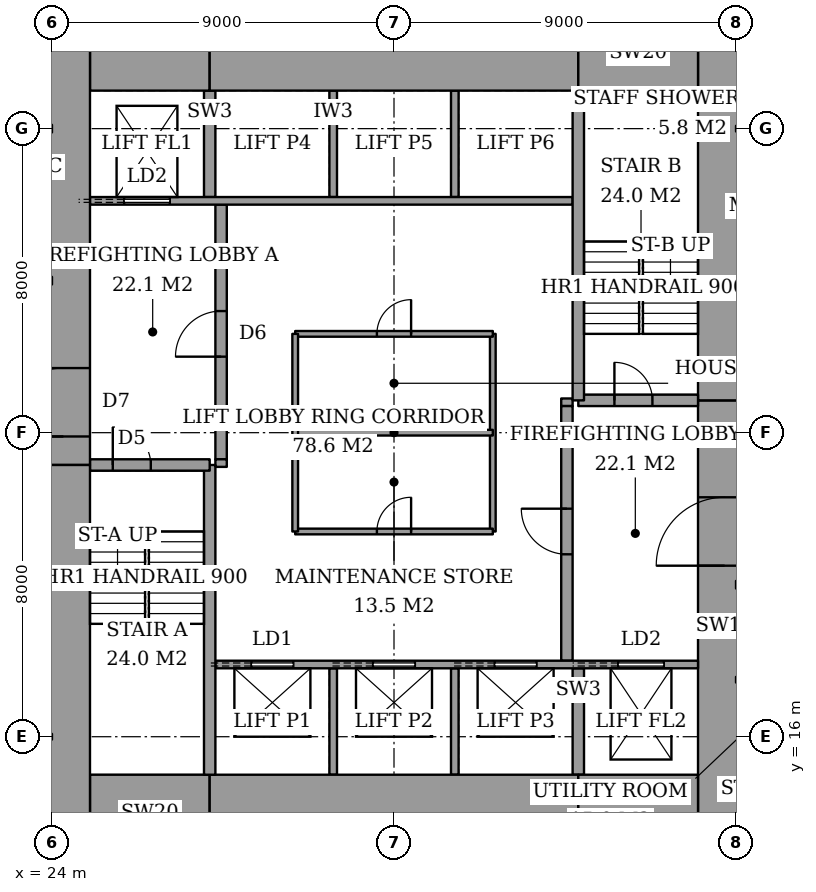
"""IFC4 building model, lengths in metres.
Left out: names, types, materials, properties, quantities, classifications, styles, units other than length and angle.
Written with IfcOpenShell. Run it as: python <this file> out.ifc"""

import sys

from ifc_helpers import new_model, si_unit, direction, frame, frame_2d, origin, place, context, subcontext, project, spatial, rectangle, extrude, element, fill, save


model = new_model("IFC4")
c1 = context("Model", 3, precision=1e-05, world=origin(), true_north=direction((0.0, 1.0)))
c2 = subcontext(c1, "Body", "Model", "MODEL_VIEW")
j1 = project(units=[si_unit("LENGTHUNIT", "METRE"), si_unit("PLANEANGLEUNIT", "RADIAN")], contexts=[c1])
p1 = place(None, origin())
s1 = spatial("IfcSite", under=j1, at=p1, CompositionType="ELEMENT")
p2 = place(p1, origin())
s2 = spatial("IfcBuilding", under=s1, at=p2, CompositionType="ELEMENT")
p3 = place(p2, frame((0.0, 0.0, 157.4)))
s3 = spatial("IfcBuildingStorey", under=s2, at=p3, CompositionType="ELEMENT", Elevation=157.4)
p4 = place(p3, frame((25.0, 14.0, 0.0), z_axis=(0.0, 0.0, 1.0), x_axis=(1.0, 0.0, 0.0)))
e1 = element("IfcWall", 1, at=p4, inside=s3, PredefinedType="SHEAR", context=c2, shape_type="SweptSolid", body=[
    extrude(rectangle(XDim=3.15, YDim=2.0, at=frame_2d((1.575, 0.0))), origin(), (0.0, 0.0, 1.0), 3.6),
])
p5 = place(p3, frame((28.15, 14.0, 0.0), z_axis=(0.0, 0.0, 1.0), x_axis=(1.0, 0.0, 0.0)))
e2 = element("IfcWall", 2, at=p5, inside=s3, PredefinedType="SHEAR", context=c2, shape_type="SweptSolid", body=[
    extrude(rectangle(XDim=9.7, YDim=2.0, at=frame_2d((4.85, 0.0))), origin(), (0.0, 0.0, 1.0), 3.6),
])
for number, where, z_axis, x_axis in (
    (3, (37.85, 14.0, 0.0), (0.0, 0.0, 1.0), (1.0, 0.0, 0.0)),
    (4, (25.0, 34.0, 0.0), (0.0, 0.0, 1.0), (1.0, 0.0, 0.0)),
):
    element("IfcWall", number, at=place(p3, frame(where, z_axis=z_axis, x_axis=x_axis)), inside=s3, PredefinedType="SHEAR", context=c2, shape_type="SweptSolid", body=[
        extrude(rectangle(XDim=3.15, YDim=2.0, at=frame_2d((1.575, 0.0))), origin(), (0.0, 0.0, 1.0), 3.6),
    ])
p6 = place(p3, frame((28.15, 34.0, 0.0), z_axis=(0.0, 0.0, 1.0), x_axis=(1.0, 0.0, 0.0)))
e5 = element("IfcWall", 5, at=p6, inside=s3, PredefinedType="SHEAR", context=c2, shape_type="SweptSolid", body=[
    extrude(rectangle(XDim=9.7, YDim=2.0, at=frame_2d((4.85, 0.0))), origin(), (0.0, 0.0, 1.0), 3.6),
])
p7 = place(p3, frame((37.85, 34.0, 0.0), z_axis=(0.0, 0.0, 1.0), x_axis=(1.0, 0.0, 0.0)))
e6 = element("IfcWall", 6, at=p7, inside=s3, PredefinedType="SHEAR", context=c2, shape_type="SweptSolid", body=[
    extrude(rectangle(XDim=3.15, YDim=2.0, at=frame_2d((1.575, 0.0))), origin(), (0.0, 0.0, 1.0), 3.6),
])
p8 = place(p3, frame((24.3, 13.0, 0.0), z_axis=(0.0, 0.0, 1.0), x_axis=(0.0, 1.0, 0.0)))
e7 = element("IfcWall", 7, at=p8, inside=s3, PredefinedType="SHEAR", context=c2, shape_type="SweptSolid", body=[
    extrude(rectangle(XDim=10.15, YDim=1.4, at=frame_2d((5.075, 0.0))), origin(), (0.0, 0.0, 1.0), 3.6),
])
p9 = place(p3, frame((24.3, 23.15, 0.0), z_axis=(0.0, 0.0, 1.0), x_axis=(0.0, 1.0, 0.0)))
e8 = element("IfcWall", 8, at=p9, inside=s3, PredefinedType="SHEAR", context=c2, shape_type="SweptSolid", body=[
    extrude(rectangle(XDim=11.85, YDim=1.4, at=frame_2d((5.925, 0.0))), origin(), (0.0, 0.0, 1.0), 3.6),
])
p10 = place(p9, frame((0.75, 0.0, 0.0)))
e9 = element("IfcOpeningElement", 9, at=p10, cuts=e8, PredefinedType="OPENING", context=c2, shape_type="SweptSolid", body=[
    extrude(rectangle(XDim=1.8, YDim=2.4, at=frame_2d((0.9, 1.2))), frame((0.0, 0.71, 0.0), z_axis=(0.0, -1.0, 0.0), x_axis=(1.0, 0.0, 0.0)), (0.0, 0.0, 1.0), 1.42),
])
p11 = place(p3, frame((41.7, 13.0, 0.0), z_axis=(0.0, 0.0, 1.0), x_axis=(0.0, 1.0, 0.0)))
e10 = element("IfcWall", 10, at=p11, inside=s3, PredefinedType="SHEAR", context=c2, shape_type="SweptSolid", body=[
    extrude(rectangle(XDim=11.85, YDim=1.4, at=frame_2d((5.925, 0.0))), origin(), (0.0, 0.0, 1.0), 3.6),
])
p12 = place(p11, frame((7.5, 0.0, 0.0)))
e11 = element("IfcOpeningElement", 11, at=p12, cuts=e10, PredefinedType="OPENING", context=c2, shape_type="SweptSolid", body=[
    extrude(rectangle(XDim=1.8, YDim=2.4, at=frame_2d((0.9, 1.2))), frame((0.0, 0.71, 0.0), z_axis=(0.0, -1.0, 0.0), x_axis=(1.0, 0.0, 0.0)), (0.0, 0.0, 1.0), 1.42),
])
p13 = place(p3, frame((41.7, 24.85, 0.0), z_axis=(0.0, 0.0, 1.0), x_axis=(0.0, 1.0, 0.0)))
e12 = element("IfcWall", 12, at=p13, inside=s3, PredefinedType="SHEAR", context=c2, shape_type="SweptSolid", body=[
    extrude(rectangle(XDim=10.15, YDim=1.4, at=frame_2d((5.075, 0.0))), origin(), (0.0, 0.0, 1.0), 3.6),
])
p14 = place(p3, frame((28.15, 15.0, 0.0), z_axis=(0.0, 0.0, 1.0), x_axis=(0.0, 1.0, 0.0)))
e13 = element("IfcWall", 13, at=p14, inside=s3, PredefinedType="SHEAR", context=c2, shape_type="SweptSolid", body=[
    extrude(rectangle(XDim=8.15, YDim=0.3, at=frame_2d((4.075, 0.0))), origin(), (0.0, 0.0, 1.0), 3.6),
])
p15 = place(p3, frame((25.0, 23.15, 0.0), z_axis=(0.0, 0.0, 1.0), x_axis=(1.0, 0.0, 0.0)))
e14 = element("IfcWall", 14, at=p15, inside=s3, PredefinedType="SHEAR", context=c2, shape_type="SweptSolid", body=[
    extrude(rectangle(XDim=3.15, YDim=0.3, at=frame_2d((1.575, 0.0))), origin(), (0.0, 0.0, 1.0), 3.6),
])
p16 = place(p15, frame((0.6, 0.0, 0.0)))
e15 = element("IfcOpeningElement", 15, at=p16, cuts=e14, PredefinedType="OPENING", context=c2, shape_type="SweptSolid", body=[
    extrude(rectangle(XDim=1.0, YDim=2.1, at=frame_2d((0.5, 1.05))), frame((0.0, 0.16, 0.0), z_axis=(0.0, -1.0, 0.0), x_axis=(1.0, 0.0, 0.0)), (0.0, 0.0, 1.0), 0.32),
])
p17 = place(p3, frame((37.85, 24.85, 0.0), z_axis=(0.0, 0.0, 1.0), x_axis=(0.0, 1.0, 0.0)))
e16 = element("IfcWall", 16, at=p17, inside=s3, PredefinedType="SHEAR", context=c2, shape_type="SweptSolid", body=[
    extrude(rectangle(XDim=8.15, YDim=0.3, at=frame_2d((4.075, 0.0))), origin(), (0.0, 0.0, 1.0), 3.6),
])
p18 = place(p3, frame((37.85, 24.85, 0.0), z_axis=(0.0, 0.0, 1.0), x_axis=(1.0, 0.0, 0.0)))
e17 = element("IfcWall", 17, at=p18, inside=s3, PredefinedType="SHEAR", context=c2, shape_type="SweptSolid", body=[
    extrude(rectangle(XDim=3.15, YDim=0.3, at=frame_2d((1.575, 0.0))), origin(), (0.0, 0.0, 1.0), 3.6),
])
p19 = place(p18, frame((0.95, 0.0, 0.0)))
e18 = element("IfcOpeningElement", 18, at=p19, cuts=e17, PredefinedType="OPENING", context=c2, shape_type="SweptSolid", body=[
    extrude(rectangle(XDim=1.0, YDim=2.1, at=frame_2d((0.5, 1.05))), frame((0.0, 0.16, 0.0), z_axis=(0.0, -1.0, 0.0), x_axis=(1.0, 0.0, 0.0)), (0.0, 0.0, 1.0), 0.32),
])
p20 = place(p3, frame((28.45, 23.3, 0.0), z_axis=(0.0, 0.0, 1.0), x_axis=(0.0, 1.0, 0.0)))
e19 = element("IfcWall", 19, at=p20, inside=s3, PredefinedType="PARTITIONING", context=c2, shape_type="SweptSolid", body=[
    extrude(rectangle(XDim=6.7, YDim=0.3, at=frame_2d((3.35, 0.0))), origin(), (0.0, 0.0, 1.0), 3.6),
])
p21 = place(p20, frame((2.7, 0.0, 0.0)))
e20 = element("IfcOpeningElement", 20, at=p21, cuts=e19, PredefinedType="OPENING", context=c2, shape_type="SweptSolid", body=[
    extrude(rectangle(XDim=1.2, YDim=2.1, at=frame_2d((0.6, 1.05))), frame((0.0, 0.16, 0.0), z_axis=(0.0, -1.0, 0.0), x_axis=(1.0, 0.0, 0.0)), (0.0, 0.0, 1.0), 0.32),
])
p22 = place(p3, frame((37.55, 18.0, 0.0), z_axis=(0.0, 0.0, 1.0), x_axis=(0.0, 1.0, 0.0)))
e21 = element("IfcWall", 21, at=p22, inside=s3, PredefinedType="PARTITIONING", context=c2, shape_type="SweptSolid", body=[
    extrude(rectangle(XDim=6.7, YDim=0.3, at=frame_2d((3.35, 0.0))), origin(), (0.0, 0.0, 1.0), 3.6),
])
p23 = place(p22, frame((2.8, 0.0, 0.0)))
e22 = element("IfcOpeningElement", 22, at=p23, cuts=e21, PredefinedType="OPENING", context=c2, shape_type="SweptSolid", body=[
    extrude(rectangle(XDim=1.2, YDim=2.1, at=frame_2d((0.6, 1.05))), frame((0.0, 0.16, 0.0), z_axis=(0.0, -1.0, 0.0), x_axis=(1.0, 0.0, 0.0)), (0.0, 0.0, 1.0), 0.32),
])
p24 = place(p3, frame((28.3, 17.9, 0.0), z_axis=(0.0, 0.0, 1.0), x_axis=(1.0, 0.0, 0.0)))
e23 = element("IfcWall", 23, at=p24, inside=s3, PredefinedType="PARTITIONING", context=c2, shape_type="SweptSolid", body=[
    extrude(rectangle(XDim=12.7, YDim=0.2, at=frame_2d((6.35, 0.0))), origin(), (0.0, 0.0, 1.0), 3.6),
])
p25 = place(p24, frame((0.95, 0.0, 0.0)))
e24 = element("IfcOpeningElement", 24, at=p25, cuts=e23, PredefinedType="OPENING", context=c2, shape_type="SweptSolid", body=[
    extrude(rectangle(XDim=1.1, YDim=2.1, at=frame_2d((0.55, 1.05))), frame((0.0, 0.11, 0.0), z_axis=(0.0, -1.0, 0.0), x_axis=(1.0, 0.0, 0.0)), (0.0, 0.0, 1.0), 0.22),
])
p26 = place(p24, frame((4.15, 0.0, 0.0)))
e25 = element("IfcOpeningElement", 25, at=p26, cuts=e23, PredefinedType="OPENING", context=c2, shape_type="SweptSolid", body=[
    extrude(rectangle(XDim=1.1, YDim=2.1, at=frame_2d((0.55, 1.05))), frame((0.0, 0.11, 0.0), z_axis=(0.0, -1.0, 0.0), x_axis=(1.0, 0.0, 0.0)), (0.0, 0.0, 1.0), 0.22),
])
p27 = place(p24, frame((7.35, 0.0, 0.0)))
e26 = element("IfcOpeningElement", 26, at=p27, cuts=e23, PredefinedType="OPENING", context=c2, shape_type="SweptSolid", body=[
    extrude(rectangle(XDim=1.1, YDim=2.1, at=frame_2d((0.55, 1.05))), frame((0.0, 0.11, 0.0), z_axis=(0.0, -1.0, 0.0), x_axis=(1.0, 0.0, 0.0)), (0.0, 0.0, 1.0), 0.22),
])
p28 = place(p24, frame((10.6, 0.0, 0.0)))
e27 = element("IfcOpeningElement", 27, at=p28, cuts=e23, PredefinedType="OPENING", context=c2, shape_type="SweptSolid", body=[
    extrude(rectangle(XDim=1.2, YDim=2.1, at=frame_2d((0.6, 1.05))), frame((0.0, 0.11, 0.0), z_axis=(0.0, -1.0, 0.0), x_axis=(1.0, 0.0, 0.0)), (0.0, 0.0, 1.0), 0.22),
])
p29 = place(p3, frame((25.0, 30.1, 0.0), z_axis=(0.0, 0.0, 1.0), x_axis=(1.0, 0.0, 0.0)))
e28 = element("IfcWall", 28, at=p29, inside=s3, PredefinedType="PARTITIONING", context=c2, shape_type="SweptSolid", body=[
    extrude(rectangle(XDim=12.7, YDim=0.2, at=frame_2d((6.35, 0.0))), origin(), (0.0, 0.0, 1.0), 3.6),
])
p30 = place(p29, frame((0.9, 0.0, 0.0)))
e29 = element("IfcOpeningElement", 29, at=p30, cuts=e28, PredefinedType="OPENING", context=c2, shape_type="SweptSolid", body=[
    extrude(rectangle(XDim=1.2, YDim=2.1, at=frame_2d((0.6, 1.05))), frame((0.0, 0.11, 0.0), z_axis=(0.0, -1.0, 0.0), x_axis=(1.0, 0.0, 0.0)), (0.0, 0.0, 1.0), 0.22),
])
for number, where, z_axis, x_axis in (
    (30, (31.4, 15.0, 0.0), (0.0, 0.0, 1.0), (0.0, 1.0, 0.0)),
    (31, (34.6, 15.0, 0.0), (0.0, 0.0, 1.0), (0.0, 1.0, 0.0)),
):
    element("IfcWall", number, at=place(p3, frame(where, z_axis=z_axis, x_axis=x_axis)), inside=s3, PredefinedType="PARTITIONING", context=c2, shape_type="SweptSolid", body=[
        extrude(rectangle(XDim=2.8, YDim=0.2, at=frame_2d((1.4, 0.0))), origin(), (0.0, 0.0, 1.0), 3.6),
    ])
p31 = place(p3, frame((37.85, 15.0, 0.0), z_axis=(0.0, 0.0, 1.0), x_axis=(0.0, 1.0, 0.0)))
e32 = element("IfcWall", 32, at=p31, inside=s3, PredefinedType="SHEAR", context=c2, shape_type="SweptSolid", body=[
    extrude(rectangle(XDim=2.8, YDim=0.3, at=frame_2d((1.4, 0.0))), origin(), (0.0, 0.0, 1.0), 3.6),
])
for number, where, z_axis, x_axis in (
    (33, (31.4, 30.2, 0.0), (0.0, 0.0, 1.0), (0.0, 1.0, 0.0)),
    (34, (34.6, 30.2, 0.0), (0.0, 0.0, 1.0), (0.0, 1.0, 0.0)),
):
    element("IfcWall", number, at=place(p3, frame(where, z_axis=z_axis, x_axis=x_axis)), inside=s3, PredefinedType="PARTITIONING", context=c2, shape_type="SweptSolid", body=[
        extrude(rectangle(XDim=2.8, YDim=0.2, at=frame_2d((1.4, 0.0))), origin(), (0.0, 0.0, 1.0), 3.6),
    ])
p32 = place(p3, frame((28.15, 30.2, 0.0), z_axis=(0.0, 0.0, 1.0), x_axis=(0.0, 1.0, 0.0)))
e35 = element("IfcWall", 35, at=p32, inside=s3, PredefinedType="SHEAR", context=c2, shape_type="SweptSolid", body=[
    extrude(rectangle(XDim=2.8, YDim=0.3, at=frame_2d((1.4, 0.0))), origin(), (0.0, 0.0, 1.0), 3.6),
])
for number, where, z_axis, x_axis in (
    (36, (28.3, 23.2, 0.0), (0.0, 0.0, 1.0), (1.0, 0.0, 0.0)),
    (37, (37.4, 24.8, 0.0), (0.0, 0.0, 1.0), (1.0, 0.0, 0.0)),
):
    element("IfcWall", number, at=place(p3, frame(where, z_axis=z_axis, x_axis=x_axis)), inside=s3, PredefinedType="PARTITIONING", context=c2, shape_type="SweptSolid", body=[
        extrude(rectangle(XDim=0.3, YDim=0.2, at=frame_2d((0.15, 0.0))), origin(), (0.0, 0.0, 1.0), 3.6),
    ])
p33 = place(p3, frame((30.4, 21.4, 0.0), z_axis=(0.0, 0.0, 1.0), x_axis=(1.0, 0.0, 0.0)))
e38 = element("IfcWall", 38, at=p33, inside=s3, PredefinedType="PARTITIONING", context=c2, shape_type="SweptSolid", body=[
    extrude(rectangle(XDim=5.2, YDim=0.15, at=frame_2d((2.6, 0.0))), origin(), (0.0, 0.0, 1.0), 3.35),
])
p34 = place(p33, frame((2.15, 0.0, 0.0)))
e39 = element("IfcOpeningElement", 39, at=p34, cuts=e38, PredefinedType="OPENING", context=c2, shape_type="SweptSolid", body=[
    extrude(rectangle(XDim=0.9, YDim=2.1, at=frame_2d((0.45, 1.05))), frame((0.0, 0.085, 0.0), z_axis=(0.0, -1.0, 0.0), x_axis=(1.0, 0.0, 0.0)), (0.0, 0.0, 1.0), 0.17),
])
p35 = place(p3, frame((30.4, 26.6, 0.0), z_axis=(0.0, 0.0, 1.0), x_axis=(1.0, 0.0, 0.0)))
e40 = element("IfcWall", 40, at=p35, inside=s3, PredefinedType="PARTITIONING", context=c2, shape_type="SweptSolid", body=[
    extrude(rectangle(XDim=5.2, YDim=0.15, at=frame_2d((2.6, 0.0))), origin(), (0.0, 0.0, 1.0), 3.35),
])
p36 = place(p35, frame((2.15, 0.0, 0.0)))
e41 = element("IfcOpeningElement", 41, at=p36, cuts=e40, PredefinedType="OPENING", context=c2, shape_type="SweptSolid", body=[
    extrude(rectangle(XDim=0.9, YDim=2.1, at=frame_2d((0.45, 1.05))), frame((0.0, 0.085, 0.0), z_axis=(0.0, -1.0, 0.0), x_axis=(1.0, 0.0, 0.0)), (0.0, 0.0, 1.0), 0.17),
])
for number, where, z_axis, x_axis in (
    (42, (30.4, 21.4, 0.0), (0.0, 0.0, 1.0), (0.0, 1.0, 0.0)),
    (43, (35.6, 21.4, 0.0), (0.0, 0.0, 1.0), (0.0, 1.0, 0.0)),
    (44, (30.4, 24.0, 0.0), (0.0, 0.0, 1.0), (1.0, 0.0, 0.0)),
):
    element("IfcWall", number, at=place(p3, frame(where, z_axis=z_axis, x_axis=x_axis)), inside=s3, PredefinedType="PARTITIONING", context=c2, shape_type="SweptSolid", body=[
        extrude(rectangle(XDim=5.2, YDim=0.15, at=frame_2d((2.6, 0.0))), origin(), (0.0, 0.0, 1.0), 3.35),
    ])
p37 = place(p16, origin())
e45 = element("IfcDoor", 45, at=p37, inside=s3, OperationType="SINGLE_SWING_RIGHT", PredefinedType="DOOR", context=c2, shape_type="SweptSolid", body=[
    extrude(rectangle(XDim=1.0, YDim=2.1, at=frame_2d((0.5, 1.05))), frame((0.0, 0.025, 0.0), z_axis=(0.0, -1.0, 0.0), x_axis=(1.0, 0.0, 0.0)), (0.0, 0.0, 1.0), 0.05),
])
fill(e15, e45)
p38 = place(p19, origin())
e46 = element("IfcDoor", 46, at=p38, inside=s3, OperationType="SINGLE_SWING_RIGHT", PredefinedType="DOOR", context=c2, shape_type="SweptSolid", body=[
    extrude(rectangle(XDim=1.0, YDim=2.1, at=frame_2d((0.5, 1.05))), frame((0.0, 0.025, 0.0), z_axis=(0.0, -1.0, 0.0), x_axis=(1.0, 0.0, 0.0)), (0.0, 0.0, 1.0), 0.05),
])
fill(e18, e46)
p39 = place(p21, origin())
e47 = element("IfcDoor", 47, at=p39, inside=s3, OperationType="SINGLE_SWING_RIGHT", PredefinedType="DOOR", context=c2, shape_type="SweptSolid", body=[
    extrude(rectangle(XDim=1.2, YDim=2.1, at=frame_2d((0.6, 1.05))), frame((0.0, 0.025, 0.0), z_axis=(0.0, -1.0, 0.0), x_axis=(1.0, 0.0, 0.0)), (0.0, 0.0, 1.0), 0.05),
])
fill(e20, e47)
p40 = place(p23, origin())
e48 = element("IfcDoor", 48, at=p40, inside=s3, OperationType="SINGLE_SWING_LEFT", PredefinedType="DOOR", context=c2, shape_type="SweptSolid", body=[
    extrude(rectangle(XDim=1.2, YDim=2.1, at=frame_2d((0.6, 1.05))), frame((0.0, 0.025, 0.0), z_axis=(0.0, -1.0, 0.0), x_axis=(1.0, 0.0, 0.0)), (0.0, 0.0, 1.0), 0.05),
])
fill(e22, e48)
p41 = place(p10, origin())
e49 = element("IfcDoor", 49, at=p41, inside=s3, OperationType="DOUBLE_DOOR_DOUBLE_SWING", PredefinedType="DOOR", context=c2, shape_type="SweptSolid", body=[
    extrude(rectangle(XDim=1.8, YDim=2.4, at=frame_2d((0.9, 1.2))), frame((0.0, 0.025, 0.0), z_axis=(0.0, -1.0, 0.0), x_axis=(1.0, 0.0, 0.0)), (0.0, 0.0, 1.0), 0.05),
])
fill(e9, e49)
p42 = place(p12, origin())
e50 = element("IfcDoor", 50, at=p42, inside=s3, OperationType="DOUBLE_DOOR_DOUBLE_SWING", PredefinedType="DOOR", context=c2, shape_type="SweptSolid", body=[
    extrude(rectangle(XDim=1.8, YDim=2.4, at=frame_2d((0.9, 1.2))), frame((0.0, 0.025, 0.0), z_axis=(0.0, -1.0, 0.0), x_axis=(1.0, 0.0, 0.0)), (0.0, 0.0, 1.0), 0.05),
])
fill(e11, e50)
p43 = place(p34, origin())
e51 = element("IfcDoor", 51, at=p43, inside=s3, OperationType="SINGLE_SWING_LEFT", PredefinedType="DOOR", context=c2, shape_type="SweptSolid", body=[
    extrude(rectangle(XDim=0.9, YDim=2.1, at=frame_2d((0.45, 1.05))), frame((0.0, 0.025, 0.0), z_axis=(0.0, -1.0, 0.0), x_axis=(1.0, 0.0, 0.0)), (0.0, 0.0, 1.0), 0.05),
])
fill(e39, e51)
p44 = place(p36, origin())
e52 = element("IfcDoor", 52, at=p44, inside=s3, OperationType="SINGLE_SWING_LEFT", PredefinedType="DOOR", context=c2, shape_type="SweptSolid", body=[
    extrude(rectangle(XDim=0.9, YDim=2.1, at=frame_2d((0.45, 1.05))), frame((0.0, 0.025, 0.0), z_axis=(0.0, -1.0, 0.0), x_axis=(1.0, 0.0, 0.0)), (0.0, 0.0, 1.0), 0.05),
])
fill(e41, e52)
p45 = place(p25, origin())
e53 = element("IfcDoor", 53, at=p45, inside=s3, OperationType="SLIDING_TO_LEFT", PredefinedType="DOOR", context=c2, shape_type="SweptSolid", body=[
    extrude(rectangle(XDim=1.1, YDim=2.1, at=frame_2d((0.55, 1.05))), frame((0.0, 0.025, 0.0), z_axis=(0.0, -1.0, 0.0), x_axis=(1.0, 0.0, 0.0)), (0.0, 0.0, 1.0), 0.05),
])
fill(e24, e53)
p46 = place(p26, origin())
e54 = element("IfcDoor", 54, at=p46, inside=s3, OperationType="SLIDING_TO_LEFT", PredefinedType="DOOR", context=c2, shape_type="SweptSolid", body=[
    extrude(rectangle(XDim=1.1, YDim=2.1, at=frame_2d((0.55, 1.05))), frame((0.0, 0.025, 0.0), z_axis=(0.0, -1.0, 0.0), x_axis=(1.0, 0.0, 0.0)), (0.0, 0.0, 1.0), 0.05),
])
fill(e25, e54)
p47 = place(p27, origin())
e55 = element("IfcDoor", 55, at=p47, inside=s3, OperationType="SLIDING_TO_LEFT", PredefinedType="DOOR", context=c2, shape_type="SweptSolid", body=[
    extrude(rectangle(XDim=1.1, YDim=2.1, at=frame_2d((0.55, 1.05))), frame((0.0, 0.025, 0.0), z_axis=(0.0, -1.0, 0.0), x_axis=(1.0, 0.0, 0.0)), (0.0, 0.0, 1.0), 0.05),
])
fill(e26, e55)
p48 = place(p30, origin())
e56 = element("IfcDoor", 56, at=p48, inside=s3, OperationType="SLIDING_TO_LEFT", PredefinedType="DOOR", context=c2, shape_type="SweptSolid", body=[
    extrude(rectangle(XDim=1.2, YDim=2.1, at=frame_2d((0.6, 1.05))), frame((0.0, 0.025, 0.0), z_axis=(0.0, -1.0, 0.0), x_axis=(1.0, 0.0, 0.0)), (0.0, 0.0, 1.0), 0.05),
])
fill(e29, e56)
p49 = place(p28, origin())
e57 = element("IfcDoor", 57, at=p49, inside=s3, OperationType="SLIDING_TO_LEFT", PredefinedType="DOOR", context=c2, shape_type="SweptSolid", body=[
    extrude(rectangle(XDim=1.2, YDim=2.1, at=frame_2d((0.6, 1.05))), frame((0.0, 0.025, 0.0), z_axis=(0.0, -1.0, 0.0), x_axis=(1.0, 0.0, 0.0)), (0.0, 0.0, 1.0), 0.05),
])
fill(e27, e57)
save(model, sys.argv[1])
